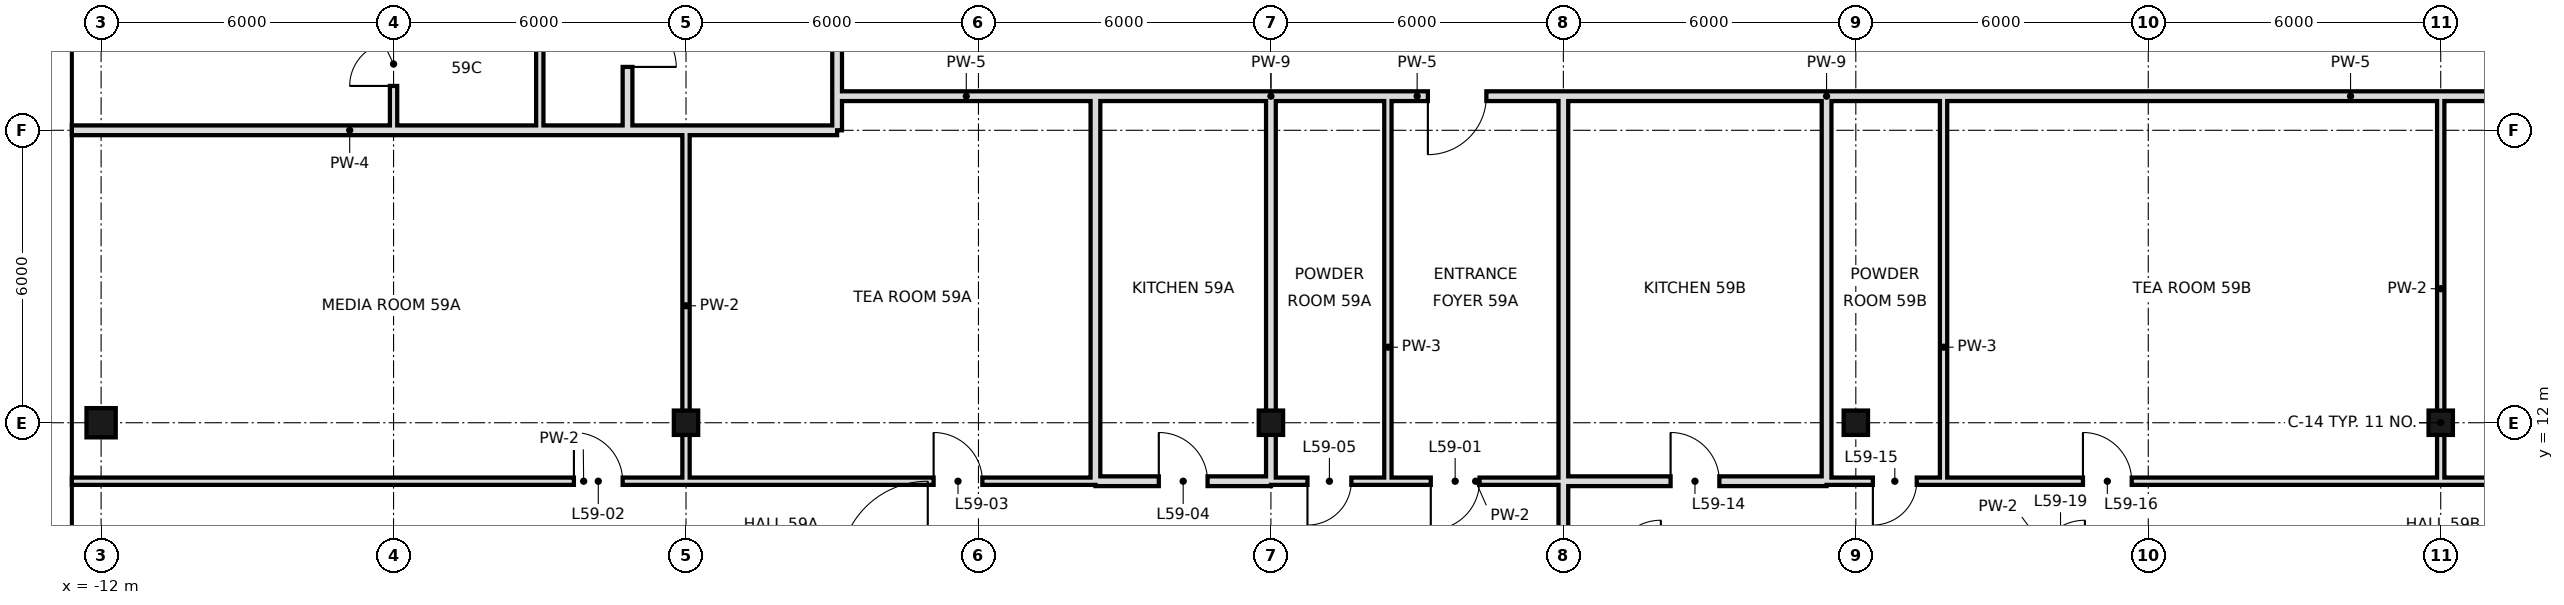
"""IFC4 building model, lengths in metres.
Left out: names, types, materials, properties, quantities, classifications, styles, units other than length and angle.
Written with IfcOpenShell. Run it as: python <this file> out.ifc"""

import sys

from ifc_helpers import new_model, si_unit, direction, frame, frame_2d, origin, origin_2d, place, context, subcontext, project, spatial, rectangle, hollow_rectangle, extrude, element, fill, save


model = new_model("IFC4")
c1 = context("Model", 3, precision=1e-05, world=origin(), true_north=direction((0.0, 1.0)))
c2 = subcontext(c1, "Body", "Model", "MODEL_VIEW")
j1 = project(units=[si_unit("LENGTHUNIT", "METRE"), si_unit("PLANEANGLEUNIT", "RADIAN")], contexts=[c1])
p1 = place(None, origin())
s1 = spatial("IfcSite", under=j1, at=p1, CompositionType="ELEMENT")
p2 = place(p1, origin())
s2 = spatial("IfcBuilding", under=s1, at=p2, CompositionType="ELEMENT")
p3 = place(p2, frame((0.0, 0.0, 250.4)))
s3 = spatial("IfcBuildingStorey", under=s2, at=p3, CompositionType="ELEMENT", Elevation=250.4)
p4 = place(p3, frame((-12.0, 12.0, 0.0), z_axis=(0.0, 0.0, 1.0), x_axis=(1.0, 0.0, 0.0)))
e1 = element("IfcColumn", 1, at=p4, inside=s3, PredefinedType="COLUMN", context=c2, shape_type="SweptSolid", body=[
    extrude(hollow_rectangle(XDim=0.6, YDim=0.6, WallThickness=0.028, at=origin_2d()), origin(), (0.0, 0.0, 1.0), 3.6),
])
for number, where, z_axis, x_axis in (
    (2, (0.0, 12.0, 0.0), (0.0, 0.0, 1.0), (1.0, 0.0, 0.0)),
    (3, (12.0, 12.0, 0.0), (0.0, 0.0, 1.0), (1.0, 0.0, 0.0)),
    (4, (24.0, 12.0, 0.0), (0.0, 0.0, 1.0), (1.0, 0.0, 0.0)),
    (5, (36.0, 12.0, 0.0), (0.0, 0.0, 1.0), (1.0, 0.0, 0.0)),
):
    element("IfcColumn", number, at=place(p3, frame(where, z_axis=z_axis, x_axis=x_axis)), inside=s3, PredefinedType="COLUMN", context=c2, shape_type="SweptSolid", body=[
        extrude(hollow_rectangle(XDim=0.5, YDim=0.5, WallThickness=0.025, at=origin_2d()), origin(), (0.0, 0.0, 1.0), 3.6),
    ])
p5 = place(p3, frame((-1.2, 18.0, 0.0), z_axis=(0.0, 0.0, 1.0), x_axis=(0.0, 1.0, 0.0)))
e6 = element("IfcWall", 6, at=p5, inside=s3, PredefinedType="SOLIDWALL", context=c2, shape_type="SweptSolid", body=[
    extrude(rectangle(XDim=3.6, YDim=0.2, at=frame_2d((1.8, 0.0))), origin(), (0.0, 0.0, 1.0), 2.72),
])
p6 = place(p5, frame((1.3, 0.0, 0.0)))
e7 = element("IfcOpeningElement", 7, at=p6, cuts=e6, PredefinedType="OPENING", context=c2, shape_type="SweptSolid", body=[
    extrude(rectangle(XDim=1.0, YDim=2.4, at=frame_2d((0.5, 1.2))), frame((0.0, 0.11, 0.0), z_axis=(0.0, -1.0, 0.0), x_axis=(1.0, 0.0, 0.0)), (0.0, 0.0, 1.0), 0.22),
])
p7 = place(p3, frame((-3.0, 18.0, 0.0), z_axis=(0.0, 0.0, 1.0), x_axis=(0.0, 1.0, 0.0)))
e8 = element("IfcWall", 8, at=p7, inside=s3, PredefinedType="PARTITIONING", context=c2, shape_type="SweptSolid", body=[
    extrude(rectangle(XDim=3.6, YDim=0.15, at=frame_2d((1.8, 0.0))), origin(), (0.0, 0.0, 1.0), 3.42),
])
p8 = place(p3, frame((-6.0, 18.0, 0.0), z_axis=(0.0, 0.0, 1.0), x_axis=(0.0, 1.0, 0.0)))
e9 = element("IfcWall", 9, at=p8, inside=s3, PredefinedType="PARTITIONING", context=c2, shape_type="SweptSolid", body=[
    extrude(rectangle(XDim=3.6, YDim=0.15, at=frame_2d((1.8, 0.0))), origin(), (0.0, 0.0, 1.0), 3.42),
])
p9 = place(p8, frame((0.91, 0.0, 0.0)))
e10 = element("IfcOpeningElement", 10, at=p9, cuts=e9, PredefinedType="OPENING", context=c2, shape_type="SweptSolid", body=[
    extrude(rectangle(XDim=0.9, YDim=2.4, at=frame_2d((0.45, 1.2))), frame((0.0, 0.085, 0.0), z_axis=(0.0, -1.0, 0.0), x_axis=(1.0, 0.0, 0.0)), (0.0, 0.0, 1.0), 0.17),
])
p10 = place(p3, frame((0.0, 10.8, 0.0), z_axis=(0.0, 0.0, 1.0), x_axis=(0.0, 1.0, 0.0)))
e11 = element("IfcWall", 11, at=p10, inside=s3, PredefinedType="PARTITIONING", context=c2, shape_type="SweptSolid", body=[
    extrude(rectangle(XDim=7.2, YDim=0.15, at=frame_2d((3.6, 0.0))), origin(), (0.0, 0.0, 1.0), 2.72),
])
p11 = place(p3, frame((12.0, 10.8, 0.0), z_axis=(0.0, 0.0, 1.0), x_axis=(0.0, 1.0, 0.0)))
e12 = element("IfcWall", 12, at=p11, inside=s3, PredefinedType="SOLIDWALL", context=c2, shape_type="SweptSolid", body=[
    extrude(rectangle(XDim=7.9, YDim=0.2, at=frame_2d((3.95, 0.0))), origin(), (0.0, 0.0, 1.0), 2.72),
])
p12 = place(p3, frame((14.4, 10.8, 0.0), z_axis=(0.0, 0.0, 1.0), x_axis=(0.0, 1.0, 0.0)))
e13 = element("IfcWall", 13, at=p12, inside=s3, PredefinedType="PARTITIONING", context=c2, shape_type="SweptSolid", body=[
    extrude(rectangle(XDim=7.9, YDim=0.15, at=frame_2d((3.95, 0.0))), origin(), (0.0, 0.0, 1.0), 3.42),
])
p13 = place(p3, frame((18.0, 10.8, 0.0), z_axis=(0.0, 0.0, 1.0), x_axis=(0.0, 1.0, 0.0)))
e14 = element("IfcWall", 14, at=p13, inside=s3, PredefinedType="SOLIDWALL", context=c2, shape_type="SweptSolid", body=[
    extrude(rectangle(XDim=7.9, YDim=0.2, at=frame_2d((3.95, 0.0))), origin(), (0.0, 0.0, 1.0), 2.72),
])
p14 = place(p3, frame((18.0, -0.6, 0.0), z_axis=(0.0, 0.0, 1.0), x_axis=(0.0, 1.0, 0.0)))
e15 = element("IfcWall", 15, at=p14, inside=s3, PredefinedType="SOLIDWALL", context=c2, shape_type="SweptSolid", body=[
    extrude(rectangle(XDim=11.4, YDim=0.2, at=frame_2d((5.7, 0.0))), origin(), (0.0, 0.0, 1.0), 2.72),
])
p15 = place(p3, frame((23.4, 10.8, 0.0), z_axis=(0.0, 0.0, 1.0), x_axis=(0.0, 1.0, 0.0)))
e16 = element("IfcWall", 16, at=p15, inside=s3, PredefinedType="SOLIDWALL", context=c2, shape_type="SweptSolid", body=[
    extrude(rectangle(XDim=7.9, YDim=0.2, at=frame_2d((3.95, 0.0))), origin(), (0.0, 0.0, 1.0), 2.72),
])
p16 = place(p3, frame((25.8, 10.8, 0.0), z_axis=(0.0, 0.0, 1.0), x_axis=(0.0, 1.0, 0.0)))
e17 = element("IfcWall", 17, at=p16, inside=s3, PredefinedType="PARTITIONING", context=c2, shape_type="SweptSolid", body=[
    extrude(rectangle(XDim=7.9, YDim=0.15, at=frame_2d((3.95, 0.0))), origin(), (0.0, 0.0, 1.0), 3.42),
])
p17 = place(p3, frame((3.1, 18.0, 0.0), z_axis=(0.0, 0.0, 1.0), x_axis=(0.0, 1.0, 0.0)))
e18 = element("IfcWall", 18, at=p17, inside=s3, PredefinedType="SOLIDWALL", context=c2, shape_type="SweptSolid", body=[
    extrude(rectangle(XDim=3.6, YDim=0.2, at=frame_2d((1.8, 0.0))), origin(), (0.0, 0.0, 1.0), 2.97),
])
p18 = place(p3, frame((36.0, 10.8, 0.0), z_axis=(0.0, 0.0, 1.0), x_axis=(0.0, 1.0, 0.0)))
e19 = element("IfcWall", 19, at=p18, inside=s3, PredefinedType="PARTITIONING", context=c2, shape_type="SweptSolid", body=[
    extrude(rectangle(XDim=7.9, YDim=0.15, at=frame_2d((3.95, 0.0))), origin(), (0.0, 0.0, 1.0), 2.72),
])
p19 = place(p3, frame((8.4, 10.8, 0.0), z_axis=(0.0, 0.0, 1.0), x_axis=(0.0, 1.0, 0.0)))
e20 = element("IfcWall", 20, at=p19, inside=s3, PredefinedType="SOLIDWALL", context=c2, shape_type="SweptSolid", body=[
    extrude(rectangle(XDim=7.9, YDim=0.2, at=frame_2d((3.95, 0.0))), origin(), (0.0, 0.0, 1.0), 2.72),
])
p20 = place(p3, frame((8.4, 10.8, 0.0), z_axis=(0.0, 0.0, 1.0), x_axis=(1.0, 0.0, 0.0)))
e21 = element("IfcWall", 21, at=p20, inside=s3, PredefinedType="SOLIDWALL", context=c2, shape_type="SweptSolid", body=[
    extrude(rectangle(XDim=3.6, YDim=0.2, at=frame_2d((1.8, 0.0))), origin(), (0.0, 0.0, 1.0), 2.72),
])
p21 = place(p20, frame((1.3, 0.0, 0.0)))
e22 = element("IfcOpeningElement", 22, at=p21, cuts=e21, PredefinedType="OPENING", context=c2, shape_type="SweptSolid", body=[
    extrude(rectangle(XDim=1.0, YDim=2.4, at=frame_2d((0.5, 1.2))), frame((0.0, 0.11, 0.0), z_axis=(0.0, -1.0, 0.0), x_axis=(1.0, 0.0, 0.0)), (0.0, 0.0, 1.0), 0.22),
])
p22 = place(p3, frame((18.0, 10.8, 0.0), z_axis=(0.0, 0.0, 1.0), x_axis=(1.0, 0.0, 0.0)))
e23 = element("IfcWall", 23, at=p22, inside=s3, PredefinedType="SOLIDWALL", context=c2, shape_type="SweptSolid", body=[
    extrude(rectangle(XDim=5.4, YDim=0.2, at=frame_2d((2.7, 0.0))), origin(), (0.0, 0.0, 1.0), 2.72),
])
p23 = place(p22, frame((2.2, 0.0, 0.0)))
e24 = element("IfcOpeningElement", 24, at=p23, cuts=e23, PredefinedType="OPENING", context=c2, shape_type="SweptSolid", body=[
    extrude(rectangle(XDim=1.0, YDim=2.4, at=frame_2d((0.5, 1.2))), frame((0.0, 0.11, 0.0), z_axis=(0.0, -1.0, 0.0), x_axis=(1.0, 0.0, 0.0)), (0.0, 0.0, 1.0), 0.22),
])
p24 = place(p3, frame((-12.6, 10.8, 0.0), z_axis=(0.0, 0.0, 1.0), x_axis=(1.0, 0.0, 0.0)))
e25 = element("IfcWall", 25, at=p24, inside=s3, PredefinedType="PARTITIONING", context=c2, shape_type="SweptSolid", body=[
    extrude(rectangle(XDim=21.0, YDim=0.15, at=frame_2d((10.5, 0.0))), origin(), (0.0, 0.0, 1.0), 3.42),
])
p25 = place(p24, frame((10.3, 0.0, 0.0)))
e26 = element("IfcOpeningElement", 26, at=p25, cuts=e25, PredefinedType="OPENING", context=c2, shape_type="SweptSolid", body=[
    extrude(rectangle(XDim=1.0, YDim=2.4, at=frame_2d((0.5, 1.2))), frame((0.0, 0.085, 0.0), z_axis=(0.0, -1.0, 0.0), x_axis=(1.0, 0.0, 0.0)), (0.0, 0.0, 1.0), 0.17),
])
p26 = place(p24, frame((17.68, 0.0, 0.0)))
e27 = element("IfcOpeningElement", 27, at=p26, cuts=e25, PredefinedType="OPENING", context=c2, shape_type="SweptSolid", body=[
    extrude(rectangle(XDim=1.0, YDim=2.4, at=frame_2d((0.5, 1.2))), frame((0.0, 0.085, 0.0), z_axis=(0.0, -1.0, 0.0), x_axis=(1.0, 0.0, 0.0)), (0.0, 0.0, 1.0), 0.17),
])
p27 = place(p3, frame((14.4, 10.8, 0.0), z_axis=(0.0, 0.0, 1.0), x_axis=(1.0, 0.0, 0.0)))
e28 = element("IfcWall", 28, at=p27, inside=s3, PredefinedType="PARTITIONING", context=c2, shape_type="SweptSolid", body=[
    extrude(rectangle(XDim=3.6, YDim=0.15, at=frame_2d((1.8, 0.0))), origin(), (0.0, 0.0, 1.0), 3.42),
])
p28 = place(p27, frame((0.88, 0.0, 0.0)))
e29 = element("IfcOpeningElement", 29, at=p28, cuts=e28, PredefinedType="OPENING", context=c2, shape_type="SweptSolid", body=[
    extrude(rectangle(XDim=1.0, YDim=2.4, at=frame_2d((0.5, 1.2))), frame((0.0, 0.085, 0.0), z_axis=(0.0, -1.0, 0.0), x_axis=(1.0, 0.0, 0.0)), (0.0, 0.0, 1.0), 0.17),
])
p29 = place(p3, frame((25.8, 10.8, 0.0), z_axis=(0.0, 0.0, 1.0), x_axis=(1.0, 0.0, 0.0)))
e30 = element("IfcWall", 30, at=p29, inside=s3, PredefinedType="PARTITIONING", context=c2, shape_type="SweptSolid", body=[
    extrude(rectangle(XDim=28.8, YDim=0.15, at=frame_2d((14.4, 0.0))), origin(), (0.0, 0.0, 1.0), 3.42),
])
p30 = place(p29, frame((11.8, 0.0, 0.0)))
e31 = element("IfcOpeningElement", 31, at=p30, cuts=e30, PredefinedType="OPENING", context=c2, shape_type="SweptSolid", body=[
    extrude(rectangle(XDim=1.0, YDim=2.4, at=frame_2d((0.5, 1.2))), frame((0.0, 0.085, 0.0), z_axis=(0.0, -1.0, 0.0), x_axis=(1.0, 0.0, 0.0)), (0.0, 0.0, 1.0), 0.17),
])
p31 = place(p29, frame((2.86, 0.0, 0.0)))
e32 = element("IfcOpeningElement", 32, at=p31, cuts=e30, PredefinedType="OPENING", context=c2, shape_type="SweptSolid", body=[
    extrude(rectangle(XDim=1.0, YDim=2.4, at=frame_2d((0.5, 1.2))), frame((0.0, 0.085, 0.0), z_axis=(0.0, -1.0, 0.0), x_axis=(1.0, 0.0, 0.0)), (0.0, 0.0, 1.0), 0.17),
])
p32 = place(p29, frame((19.6, 0.0, 0.0)))
e33 = element("IfcOpeningElement", 33, at=p32, cuts=e30, PredefinedType="OPENING", context=c2, shape_type="SweptSolid", body=[
    extrude(rectangle(XDim=1.0, YDim=2.4, at=frame_2d((0.5, 1.2))), frame((0.0, 0.085, 0.0), z_axis=(0.0, -1.0, 0.0), x_axis=(1.0, 0.0, 0.0)), (0.0, 0.0, 1.0), 0.17),
])
p33 = place(p3, frame((12.0, 10.8, 0.0), z_axis=(0.0, 0.0, 1.0), x_axis=(1.0, 0.0, 0.0)))
e34 = element("IfcWall", 34, at=p33, inside=s3, PredefinedType="PARTITIONING", context=c2, shape_type="SweptSolid", body=[
    extrude(rectangle(XDim=2.4, YDim=0.15, at=frame_2d((1.2, 0.0))), origin(), (0.0, 0.0, 1.0), 3.42),
])
p34 = place(p33, frame((0.75, 0.0, 0.0)))
e35 = element("IfcOpeningElement", 35, at=p34, cuts=e34, PredefinedType="OPENING", context=c2, shape_type="SweptSolid", body=[
    extrude(rectangle(XDim=0.9, YDim=2.4, at=frame_2d((0.45, 1.2))), frame((0.0, 0.085, 0.0), z_axis=(0.0, -1.0, 0.0), x_axis=(1.0, 0.0, 0.0)), (0.0, 0.0, 1.0), 0.17),
])
p35 = place(p3, frame((23.4, 10.8, 0.0), z_axis=(0.0, 0.0, 1.0), x_axis=(1.0, 0.0, 0.0)))
e36 = element("IfcWall", 36, at=p35, inside=s3, PredefinedType="PARTITIONING", context=c2, shape_type="SweptSolid", body=[
    extrude(rectangle(XDim=2.4, YDim=0.15, at=frame_2d((1.2, 0.0))), origin(), (0.0, 0.0, 1.0), 3.42),
])
p36 = place(p35, frame((0.95, 0.0, 0.0)))
e37 = element("IfcOpeningElement", 37, at=p36, cuts=e36, PredefinedType="OPENING", context=c2, shape_type="SweptSolid", body=[
    extrude(rectangle(XDim=0.9, YDim=2.4, at=frame_2d((0.45, 1.2))), frame((0.0, 0.085, 0.0), z_axis=(0.0, -1.0, 0.0), x_axis=(1.0, 0.0, 0.0)), (0.0, 0.0, 1.0), 0.17),
])
p37 = place(p3, frame((-1.2, 18.0, 0.0), z_axis=(0.0, 0.0, 1.0), x_axis=(1.0, 0.0, 0.0)))
e38 = element("IfcWall", 38, at=p37, inside=s3, PredefinedType="SOLIDWALL", context=c2, shape_type="SweptSolid", body=[
    extrude(rectangle(XDim=4.3, YDim=0.2, at=frame_2d((2.15, 0.0))), origin(), (0.0, 0.0, 1.0), 2.72),
])
p38 = place(p3, frame((-12.6, 18.0, 0.0), z_axis=(0.0, 0.0, 1.0), x_axis=(1.0, 0.0, 0.0)))
e39 = element("IfcWall", 39, at=p38, inside=s3, PredefinedType="SOLIDWALL", context=c2, shape_type="SweptSolid", body=[
    extrude(rectangle(XDim=11.4, YDim=0.2, at=frame_2d((5.7, 0.0))), origin(), (0.0, 0.0, 1.0), 2.72),
])
p39 = place(p3, frame((3.1, 18.7, 0.0), z_axis=(0.0, 0.0, 1.0), x_axis=(1.0, 0.0, 0.0)))
e40 = element("IfcWall", 40, at=p39, inside=s3, PredefinedType="SOLIDWALL", context=c2, shape_type="SweptSolid", body=[
    extrude(rectangle(XDim=5.3, YDim=0.2, at=frame_2d((2.65, 0.0))), origin(), (0.0, 0.0, 1.0), 2.72),
])
p40 = place(p3, frame((12.0, 18.7, 0.0), z_axis=(0.0, 0.0, 1.0), x_axis=(1.0, 0.0, 0.0)))
e41 = element("IfcWall", 41, at=p40, inside=s3, PredefinedType="SOLIDWALL", context=c2, shape_type="SweptSolid", body=[
    extrude(rectangle(XDim=6.0, YDim=0.2, at=frame_2d((3.0, 0.0))), origin(), (0.0, 0.0, 1.0), 2.72),
])
p41 = place(p40, frame((3.22, 0.0, 0.0)))
e42 = element("IfcOpeningElement", 42, at=p41, cuts=e41, PredefinedType="OPENING", context=c2, shape_type="SweptSolid", body=[
    extrude(rectangle(XDim=1.2, YDim=2.4, at=frame_2d((0.6, 1.2))), frame((0.0, 0.11, 0.0), z_axis=(0.0, -1.0, 0.0), x_axis=(1.0, 0.0, 0.0)), (0.0, 0.0, 1.0), 0.22),
])
p42 = place(p3, frame((23.4, 18.7, 0.0), z_axis=(0.0, 0.0, 1.0), x_axis=(1.0, 0.0, 0.0)))
e43 = element("IfcWall", 43, at=p42, inside=s3, PredefinedType="SOLIDWALL", context=c2, shape_type="SweptSolid", body=[
    extrude(rectangle(XDim=21.5, YDim=0.2, at=frame_2d((10.75, 0.0))), origin(), (0.0, 0.0, 1.0), 2.72),
])
p43 = place(p42, frame((15.86, 0.0, 0.0)))
e44 = element("IfcOpeningElement", 44, at=p43, cuts=e43, PredefinedType="OPENING", context=c2, shape_type="SweptSolid", body=[
    extrude(rectangle(XDim=1.2, YDim=2.4, at=frame_2d((0.6, 1.2))), frame((0.0, 0.11, 0.0), z_axis=(0.0, -1.0, 0.0), x_axis=(1.0, 0.0, 0.0)), (0.0, 0.0, 1.0), 0.22),
])
p44 = place(p3, frame((8.4, 18.7, 0.0), z_axis=(0.0, 0.0, 1.0), x_axis=(1.0, 0.0, 0.0)))
e45 = element("IfcWall", 45, at=p44, inside=s3, PredefinedType="SOLIDWALL", context=c2, shape_type="SweptSolid", body=[
    extrude(rectangle(XDim=3.6, YDim=0.2, at=frame_2d((1.8, 0.0))), origin(), (0.0, 0.0, 1.0), 3.42),
])
p45 = place(p3, frame((18.0, 18.7, 0.0), z_axis=(0.0, 0.0, 1.0), x_axis=(1.0, 0.0, 0.0)))
e46 = element("IfcWall", 46, at=p45, inside=s3, PredefinedType="SOLIDWALL", context=c2, shape_type="SweptSolid", body=[
    extrude(rectangle(XDim=5.4, YDim=0.2, at=frame_2d((2.7, 0.0))), origin(), (0.0, 0.0, 1.0), 2.72),
])
p46 = place(p28, frame((1.0, 0.0, 0.0), z_axis=(0.0, 0.0, 1.0), x_axis=(-1.0, 0.0, 0.0)))
e47 = element("IfcDoor", 47, at=p46, inside=s3, OperationType="SINGLE_SWING_RIGHT", PredefinedType="DOOR", context=c2, shape_type="SweptSolid", body=[
    extrude(rectangle(XDim=1.0, YDim=2.4, at=frame_2d((0.5, 1.2))), frame((0.0, 0.025, 0.0), z_axis=(0.0, -1.0, 0.0), x_axis=(1.0, 0.0, 0.0)), (0.0, 0.0, 1.0), 0.05),
])
fill(e29, e47)
p47 = place(p25, origin())
e48 = element("IfcDoor", 48, at=p47, inside=s3, OperationType="SINGLE_SWING_LEFT", PredefinedType="DOOR", context=c2, shape_type="SweptSolid", body=[
    extrude(rectangle(XDim=1.0, YDim=2.4, at=frame_2d((0.5, 1.2))), frame((0.0, 0.025, 0.0), z_axis=(0.0, -1.0, 0.0), x_axis=(1.0, 0.0, 0.0)), (0.0, 0.0, 1.0), 0.05),
])
fill(e26, e48)
p48 = place(p26, origin())
e49 = element("IfcDoor", 49, at=p48, inside=s3, OperationType="SINGLE_SWING_LEFT", PredefinedType="DOOR", context=c2, shape_type="SweptSolid", body=[
    extrude(rectangle(XDim=1.0, YDim=2.4, at=frame_2d((0.5, 1.2))), frame((0.0, 0.025, 0.0), z_axis=(0.0, -1.0, 0.0), x_axis=(1.0, 0.0, 0.0)), (0.0, 0.0, 1.0), 0.05),
])
fill(e27, e49)
p49 = place(p21, origin())
e50 = element("IfcDoor", 50, at=p49, inside=s3, OperationType="SINGLE_SWING_LEFT", PredefinedType="DOOR", context=c2, shape_type="SweptSolid", body=[
    extrude(rectangle(XDim=1.0, YDim=2.4, at=frame_2d((0.5, 1.2))), frame((0.0, 0.025, 0.0), z_axis=(0.0, -1.0, 0.0), x_axis=(1.0, 0.0, 0.0)), (0.0, 0.0, 1.0), 0.05),
])
fill(e22, e50)
p50 = place(p34, frame((0.9, 0.0, 0.0), z_axis=(0.0, 0.0, 1.0), x_axis=(-1.0, 0.0, 0.0)))
e51 = element("IfcDoor", 51, at=p50, inside=s3, OperationType="SINGLE_SWING_RIGHT", PredefinedType="DOOR", context=c2, shape_type="SweptSolid", body=[
    extrude(rectangle(XDim=0.9, YDim=2.4, at=frame_2d((0.45, 1.2))), frame((0.0, 0.025, 0.0), z_axis=(0.0, -1.0, 0.0), x_axis=(1.0, 0.0, 0.0)), (0.0, 0.0, 1.0), 0.05),
])
fill(e35, e51)
p51 = place(p23, origin())
e52 = element("IfcDoor", 52, at=p51, inside=s3, OperationType="SINGLE_SWING_LEFT", PredefinedType="DOOR", context=c2, shape_type="SweptSolid", body=[
    extrude(rectangle(XDim=1.0, YDim=2.4, at=frame_2d((0.5, 1.2))), frame((0.0, 0.025, 0.0), z_axis=(0.0, -1.0, 0.0), x_axis=(1.0, 0.0, 0.0)), (0.0, 0.0, 1.0), 0.05),
])
fill(e24, e52)
p52 = place(p36, frame((0.9, 0.0, 0.0), z_axis=(0.0, 0.0, 1.0), x_axis=(-1.0, 0.0, 0.0)))
e53 = element("IfcDoor", 53, at=p52, inside=s3, OperationType="SINGLE_SWING_RIGHT", PredefinedType="DOOR", context=c2, shape_type="SweptSolid", body=[
    extrude(rectangle(XDim=0.9, YDim=2.4, at=frame_2d((0.45, 1.2))), frame((0.0, 0.025, 0.0), z_axis=(0.0, -1.0, 0.0), x_axis=(1.0, 0.0, 0.0)), (0.0, 0.0, 1.0), 0.05),
])
fill(e37, e53)
p53 = place(p31, origin())
e54 = element("IfcDoor", 54, at=p53, inside=s3, OperationType="SINGLE_SWING_LEFT", PredefinedType="DOOR", context=c2, shape_type="SweptSolid", body=[
    extrude(rectangle(XDim=1.0, YDim=2.4, at=frame_2d((0.5, 1.2))), frame((0.0, 0.025, 0.0), z_axis=(0.0, -1.0, 0.0), x_axis=(1.0, 0.0, 0.0)), (0.0, 0.0, 1.0), 0.05),
])
fill(e32, e54)
p54 = place(p6, frame((1.0, 0.0, 0.0), z_axis=(0.0, 0.0, 1.0), x_axis=(-1.0, 0.0, 0.0)))
e55 = element("IfcDoor", 55, at=p54, inside=s3, OperationType="SINGLE_SWING_RIGHT", PredefinedType="DOOR", context=c2, shape_type="SweptSolid", body=[
    extrude(rectangle(XDim=1.0, YDim=2.4, at=frame_2d((0.5, 1.2))), frame((0.0, 0.025, 0.0), z_axis=(0.0, -1.0, 0.0), x_axis=(1.0, 0.0, 0.0)), (0.0, 0.0, 1.0), 0.05),
])
fill(e7, e55)
p55 = place(p9, origin())
e56 = element("IfcDoor", 56, at=p55, inside=s3, OperationType="SINGLE_SWING_LEFT", PredefinedType="DOOR", context=c2, shape_type="SweptSolid", body=[
    extrude(rectangle(XDim=0.9, YDim=2.4, at=frame_2d((0.45, 1.2))), frame((0.0, 0.025, 0.0), z_axis=(0.0, -1.0, 0.0), x_axis=(1.0, 0.0, 0.0)), (0.0, 0.0, 1.0), 0.05),
])
fill(e10, e56)
p56 = place(p41, frame((1.2, 0.0, 0.0), z_axis=(0.0, 0.0, 1.0), x_axis=(-1.0, 0.0, 0.0)))
e57 = element("IfcDoor", 57, at=p56, inside=s3, OperationType="SINGLE_SWING_RIGHT", PredefinedType="DOOR", context=c2, shape_type="SweptSolid", body=[
    extrude(rectangle(XDim=1.2, YDim=2.4, at=frame_2d((0.6, 1.2))), frame((0.0, 0.025, 0.0), z_axis=(0.0, -1.0, 0.0), x_axis=(1.0, 0.0, 0.0)), (0.0, 0.0, 1.0), 0.05),
])
fill(e42, e57)
save(model, sys.argv[1])
